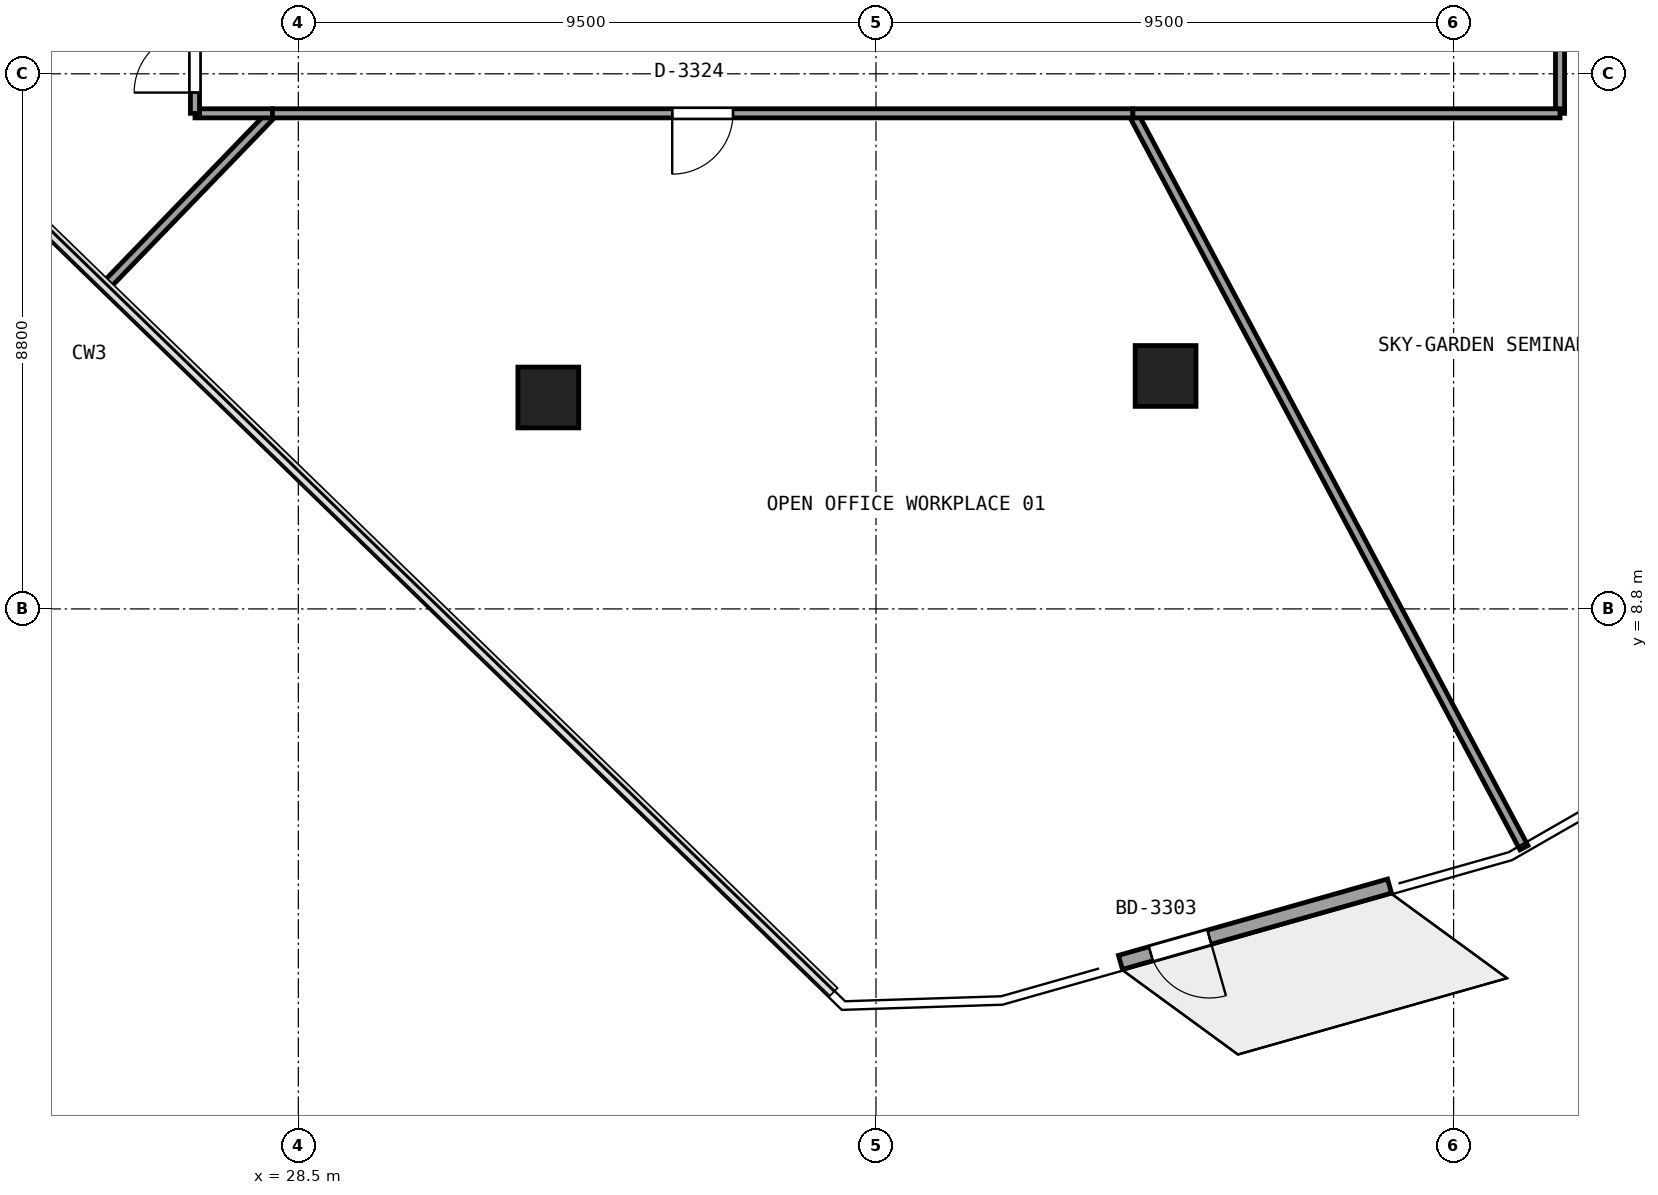
"""IFC4 building model, lengths in metres.
Left out: names, types, materials, properties, quantities, classifications, styles, units other than length and angle.
Written with IfcOpenShell. Run it as: python <this file> out.ifc"""

import sys

from ifc_helpers import new_model, si_unit, direction, frame, frame_2d, origin, origin_2d, place, context, subcontext, project, spatial, rectangle, extrude, element, fill, save


model = new_model("IFC4")
c1 = context("Model", 3, precision=1e-05, world=origin(), true_north=direction((0.0, 1.0)))
c2 = subcontext(c1, "Body", "Model", "MODEL_VIEW")
j1 = project(units=[si_unit("LENGTHUNIT", "METRE"), si_unit("PLANEANGLEUNIT", "RADIAN")], contexts=[c1])
p1 = place(None, origin())
s1 = spatial("IfcSite", under=j1, at=p1, CompositionType="ELEMENT")
p2 = place(p1, origin())
s2 = spatial("IfcBuilding", under=s1, at=p2, CompositionType="ELEMENT")
p3 = place(p2, frame((0.0, 0.0, 125.7)))
s3 = spatial("IfcBuildingStorey", under=s2, at=p3, CompositionType="ELEMENT", Elevation=125.7)
for number, where, z_axis, x_axis in (
    (1, (32.611, 12.277, -0.405), (0.0, 0.0, 1.0), (1.0, 0.0, 0.0)),
    (2, (42.763, 12.631, -0.405), (0.0, 0.0, 1.0), (1.0, 0.0, 0.0)),
):
    element("IfcColumn", number, at=place(p3, frame(where, z_axis=z_axis, x_axis=x_axis)), inside=s3, PredefinedType="COLUMN", context=c2, shape_type="SweptSolid", body=[
        extrude(rectangle(XDim=1.0, YDim=1.0, at=origin_2d()), origin(), (0.0, 0.0, 1.0), 3.725),
    ])
p4 = place(p3, frame((46.446, 4.242, 0.0), z_axis=(0.0, 0.0, 1.0), x_axis=(-0.962062892843, -0.272827766577, 0.0)))
e3 = element("IfcWall", 3, at=p4, inside=s3, PredefinedType="SOLIDWALL", context=c2, shape_type="SweptSolid", body=[
    extrude(rectangle(XDim=4.6, YDim=0.24, at=frame_2d((2.3, 0.0))), origin(), (0.0, 0.0, 1.0), 3.32),
])
p5 = place(p4, frame((3.08, 0.0, 0.0)))
e4 = element("IfcOpeningElement", 4, at=p5, cuts=e3, PredefinedType="OPENING", context=c2, shape_type="SweptSolid", body=[
    extrude(rectangle(XDim=1.0, YDim=2.15, at=frame_2d((0.5, 1.075))), frame((0.0, 0.13, 0.0), z_axis=(0.0, -1.0, 0.0), x_axis=(1.0, 0.0, 0.0)), (0.0, 0.0, 1.0), 0.26),
])
p6 = place(p3, frame((25.313, 14.092, 0.0), z_axis=(0.0, 0.0, 1.0), x_axis=(0.694806096169, 0.719197113958, 0.0)))
e5 = element("IfcWall", 5, at=p6, inside=s3, PredefinedType="PARTITIONING", context=c2, shape_type="SweptSolid", body=[
    extrude(rectangle(XDim=3.974, YDim=0.15, at=frame_2d((1.987, 0.0))), origin(), (0.0, 0.0, 1.0), 2.805),
])
p7 = place(p3, frame((28.074, 16.95, 0.0), z_axis=(0.0, 0.0, 1.0), x_axis=(-1.0, 0.0, 0.0)))
e6 = element("IfcWall", 6, at=p7, inside=s3, PredefinedType="PARTITIONING", context=c2, shape_type="SweptSolid", body=[
    extrude(rectangle(XDim=1.274, YDim=0.15, at=frame_2d((0.637, 0.0))), origin(), (0.0, 0.0, 1.0), 2.805),
])
p8 = place(p3, frame((26.8, 16.95, 0.0), z_axis=(0.0, 0.0, 1.0), x_axis=(0.0, 1.0, 0.0)))
e7 = element("IfcWall", 7, at=p8, inside=s3, PredefinedType="PARTITIONING", context=c2, shape_type="SweptSolid", body=[
    extrude(rectangle(XDim=1.95, YDim=0.15, at=frame_2d((0.975, 0.0))), origin(), (0.0, 0.0, 1.0), 2.805),
])
p9 = place(p8, frame((0.341, 0.0, 0.0)))
e8 = element("IfcOpeningElement", 8, at=p9, cuts=e7, PredefinedType="OPENING", context=c2, shape_type="SweptSolid", body=[
    extrude(rectangle(XDim=1.0, YDim=2.15, at=frame_2d((0.5, 1.075))), frame((0.0, 0.085, 0.0), z_axis=(0.0, -1.0, 0.0), x_axis=(1.0, 0.0, 0.0)), (0.0, 0.0, 1.0), 0.17),
])
p10 = place(p3, frame((48.657, 4.873, 0.0), z_axis=(0.0, 0.0, 1.0), x_axis=(-0.470068613312, 0.882629876437, 0.0)))
e9 = element("IfcWall", 9, at=p10, inside=s3, PredefinedType="PARTITIONING", context=c2, shape_type="SweptSolid", body=[
    extrude(rectangle(XDim=13.683, YDim=0.15, at=frame_2d((6.841, 0.0))), origin(), (0.0, 0.0, 1.0), 2.805),
])
p11 = place(p3, frame((42.225, 16.95, 0.0), z_axis=(0.0, 0.0, 1.0), x_axis=(-1.0, 0.0, 0.0)))
e10 = element("IfcWall", 10, at=p11, inside=s3, PredefinedType="PARTITIONING", context=c2, shape_type="SweptSolid", body=[
    extrude(rectangle(XDim=14.151, YDim=0.15, at=frame_2d((7.076, 0.0))), origin(), (0.0, 0.0, 1.0), 2.687),
])
p12 = place(p11, frame((6.576, 0.0, 0.0)))
e11 = element("IfcOpeningElement", 11, at=p12, cuts=e10, PredefinedType="OPENING", context=c2, shape_type="SweptSolid", body=[
    extrude(rectangle(XDim=1.0, YDim=2.15, at=frame_2d((0.5, 1.075))), frame((0.0, 0.085, 0.0), z_axis=(0.0, -1.0, 0.0), x_axis=(1.0, 0.0, 0.0)), (0.0, 0.0, 1.0), 0.17),
])
p13 = place(p3, frame((49.25, 18.6, 0.0), z_axis=(0.0, 0.0, 1.0), x_axis=(0.0, -1.0, 0.0)))
e12 = element("IfcWall", 12, at=p13, inside=s3, PredefinedType="PARTITIONING", context=c2, shape_type="SweptSolid", body=[
    extrude(rectangle(XDim=1.65, YDim=0.15, at=frame_2d((0.825, 0.0))), origin(), (0.0, 0.0, 1.0), 3.32),
])
p14 = place(p3, frame((49.25, 16.95, 0.0), z_axis=(0.0, 0.0, 1.0), x_axis=(-1.0, 0.0, 0.0)))
e13 = element("IfcWall", 13, at=p14, inside=s3, PredefinedType="PARTITIONING", context=c2, shape_type="SweptSolid", body=[
    extrude(rectangle(XDim=7.025, YDim=0.15, at=frame_2d((3.512, 0.0))), origin(), (0.0, 0.0, 1.0), 2.805),
])
p15 = place(p5, origin())
e14 = element("IfcDoor", 14, at=p15, inside=s3, OperationType="SINGLE_SWING_LEFT", PredefinedType="DOOR", context=c2, shape_type="SweptSolid", body=[
    extrude(rectangle(XDim=1.0, YDim=2.15, at=frame_2d((0.5, 1.075))), frame((0.0, 0.025, 0.0), z_axis=(0.0, -1.0, 0.0), x_axis=(1.0, 0.0, 0.0)), (0.0, 0.0, 1.0), 0.05),
])
fill(e4, e14)
p16 = place(p9, origin())
e15 = element("IfcDoor", 15, at=p16, inside=s3, OperationType="SINGLE_SWING_LEFT", PredefinedType="DOOR", context=c2, shape_type="SweptSolid", body=[
    extrude(rectangle(XDim=1.0, YDim=2.15, at=frame_2d((0.5, 1.075))), frame((0.0, 0.025, 0.0), z_axis=(0.0, -1.0, 0.0), x_axis=(1.0, 0.0, 0.0)), (0.0, 0.0, 1.0), 0.05),
])
fill(e8, e15)
p17 = place(p12, origin())
e16 = element("IfcDoor", 16, at=p17, inside=s3, OperationType="SINGLE_SWING_RIGHT", PredefinedType="DOOR", context=c2, shape_type="SweptSolid", body=[
    extrude(rectangle(XDim=1.0, YDim=2.15, at=frame_2d((0.5, 1.075))), frame((0.0, 0.025, 0.0), z_axis=(0.0, -1.0, 0.0), x_axis=(1.0, 0.0, 0.0)), (0.0, 0.0, 1.0), 0.05),
])
fill(e11, e16)
save(model, sys.argv[1])
